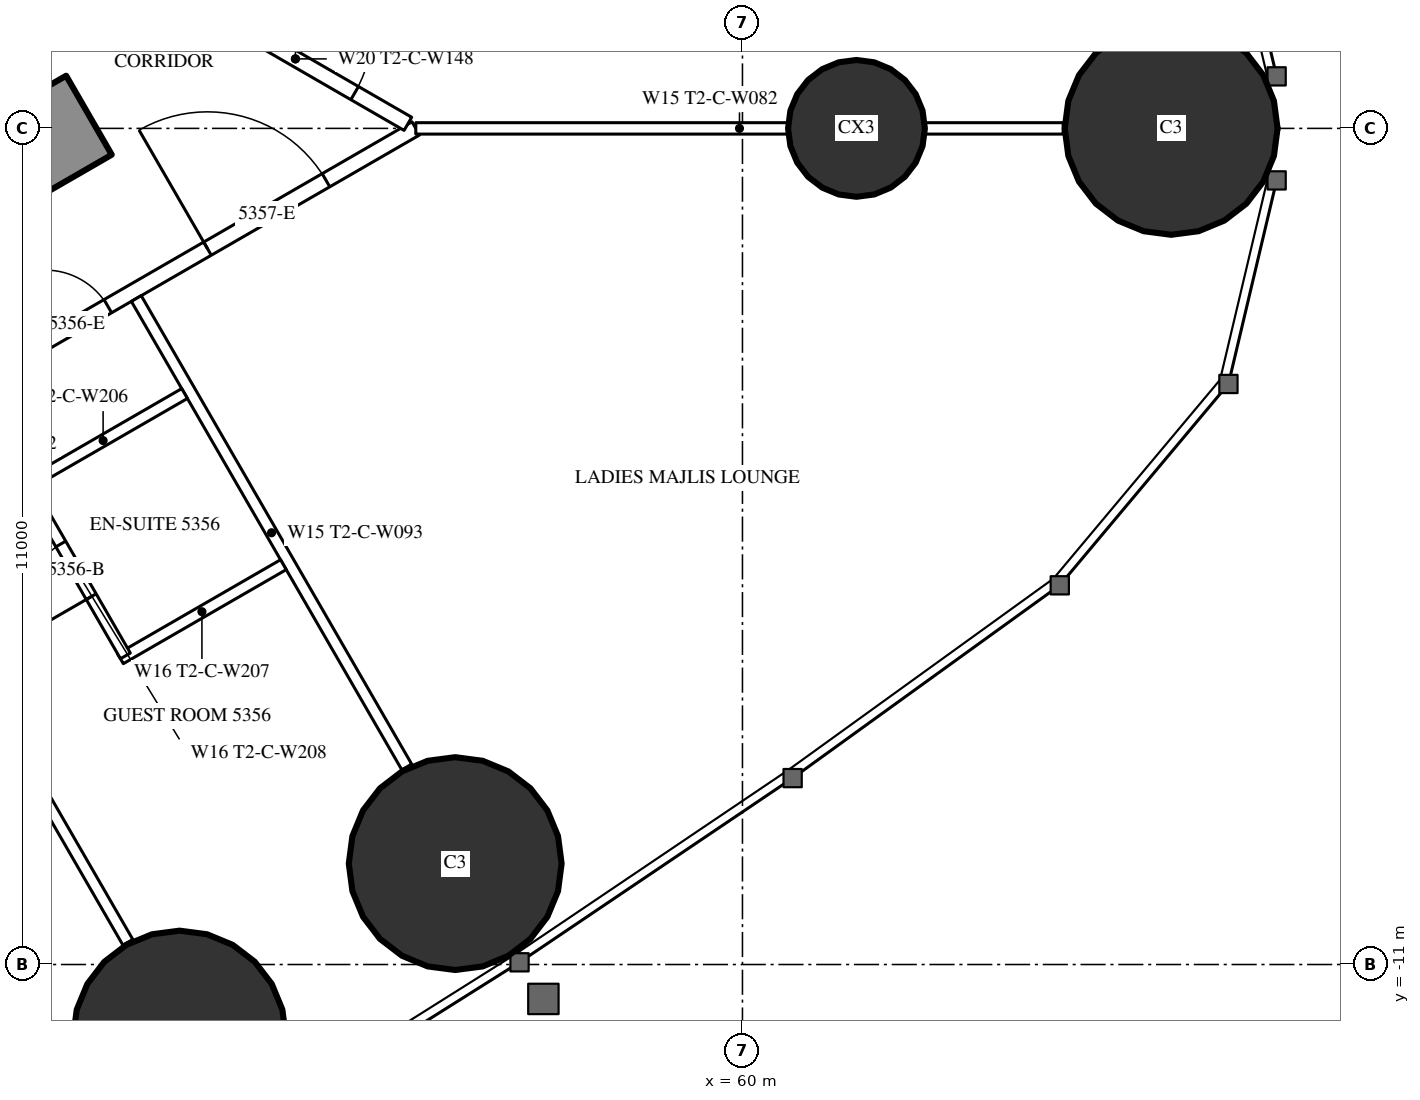
"""IFC4 building model, lengths in metres.
Left out: names, types, materials, properties, quantities, classifications, styles, units other than length and angle.
Written with IfcOpenShell. Run it as: python <this file> out.ifc"""

import sys

from ifc_helpers import new_model, si_unit, direction, frame, frame_2d, origin, origin_2d, place, context, subcontext, project, spatial, rectangle, circle, extrude, element, fill, save


model = new_model("IFC4")
c1 = context("Model", 3, precision=1e-05, world=origin(), true_north=direction((0.0, 1.0)))
c2 = subcontext(c1, "Body", "Model", "MODEL_VIEW")
j1 = project(units=[si_unit("LENGTHUNIT", "METRE"), si_unit("PLANEANGLEUNIT", "RADIAN")], contexts=[c1])
p1 = place(None, origin())
s1 = spatial("IfcSite", under=j1, at=p1, CompositionType="ELEMENT")
p2 = place(p1, origin())
s2 = spatial("IfcBuilding", under=s1, at=p2, CompositionType="ELEMENT")
p3 = place(p2, frame((0.0, 0.0, 198.3)))
s3 = spatial("IfcBuildingStorey", under=s2, at=p3, CompositionType="ELEMENT", Elevation=198.3)
for number, where, z_axis, x_axis in (
    (1, (65.64, 0.0, 0.0), (0.0, 0.0, 1.0), (1.0, 0.0, 0.0)),
    (2, (52.594, -11.955, 0.0), (0.0, 0.0, 1.0), (1.0, 0.0, 0.0)),
    (3, (56.221, -9.672, 0.0), (0.0, 0.0, 1.0), (1.0, 0.0, 0.0)),
):
    element("IfcColumn", number, at=place(p3, frame(where, z_axis=z_axis, x_axis=x_axis)), inside=s3, PredefinedType="COLUMN", context=c2, shape_type="SweptSolid", body=[
        extrude(circle(Radius=1.4, at=origin_2d()), origin(), (0.0, 0.0, 1.0), 3.5),
    ])
p4 = place(p3, frame((61.5, 0.0, 0.0), z_axis=(0.0, 0.0, 1.0), x_axis=(1.0, 0.0, 0.0)))
e4 = element("IfcColumn", 4, at=p4, inside=s3, PredefinedType="COLUMN", context=c2, shape_type="SweptSolid", body=[
    extrude(circle(Radius=0.9, at=origin_2d()), origin(), (0.0, 0.0, 1.0), 3.5),
])
p5 = place(p3, frame((27.2, -13.8, 0.0), z_axis=(0.0, 0.0, 1.0), x_axis=(0.866027159892, 0.499996958321, 0.0)))
e5 = element("IfcWall", 5, at=p5, inside=s3, PredefinedType="SHEAR", context=c2, shape_type="SweptSolid", body=[
    extrude(rectangle(XDim=27.947, YDim=1.2, at=frame_2d((13.973, 0.0))), origin(), (0.0, 0.0, 1.0), 3.5),
])
p6 = place(p5, frame((4.6, 0.0, 0.0)))
e6 = element("IfcOpeningElement", 6, at=p6, cuts=e5, PredefinedType="OPENING", context=c2, shape_type="SweptSolid", body=[
    extrude(rectangle(XDim=1.0, YDim=2.2, at=frame_2d((0.5, 1.1))), frame((0.0, 0.61, 0.0), z_axis=(0.0, -1.0, 0.0), x_axis=(1.0, 0.0, 0.0)), (0.0, 0.0, 1.0), 1.22),
])
p7 = place(p5, frame((13.395, 0.0, 0.0)))
e7 = element("IfcOpeningElement", 7, at=p7, cuts=e5, PredefinedType="OPENING", context=c2, shape_type="SweptSolid", body=[
    extrude(rectangle(XDim=1.8, YDim=2.2, at=frame_2d((0.9, 1.1))), frame((0.0, 0.61, 0.0), z_axis=(0.0, -1.0, 0.0), x_axis=(1.0, 0.0, 0.0)), (0.0, 0.0, 1.0), 1.22),
])
p8 = place(p3, frame((27.959, -16.017, 0.0), z_axis=(0.0, 0.0, 1.0), x_axis=(0.866024151371, 0.500002169237, 0.0)))
e8 = element("IfcWall", 8, at=p8, inside=s3, PredefinedType="PARTITIONING", context=c2, shape_type="SweptSolid", body=[
    extrude(rectangle(XDim=32.034, YDim=0.2, at=frame_2d((16.017, 0.0))), origin(), (0.0, 0.0, 1.0), 3.25),
])
p9 = place(p8, frame((0.6, 0.0, 0.0)))
e9 = element("IfcOpeningElement", 9, at=p9, cuts=e8, PredefinedType="OPENING", context=c2, shape_type="SweptSolid", body=[
    extrude(rectangle(XDim=0.95, YDim=2.2, at=frame_2d((0.475, 1.1))), frame((0.0, 0.11, 0.0), z_axis=(0.0, -1.0, 0.0), x_axis=(1.0, 0.0, 0.0)), (0.0, 0.0, 1.0), 0.22),
])
p10 = place(p8, frame((13.132, 0.0, 0.0)))
e10 = element("IfcOpeningElement", 10, at=p10, cuts=e8, PredefinedType="OPENING", context=c2, shape_type="SweptSolid", body=[
    extrude(rectangle(XDim=0.95, YDim=2.2, at=frame_2d((0.475, 1.1))), frame((0.0, 0.11, 0.0), z_axis=(0.0, -1.0, 0.0), x_axis=(1.0, 0.0, 0.0)), (0.0, 0.0, 1.0), 0.22),
])
p11 = place(p8, frame((15.391, 0.0, 0.0)))
e11 = element("IfcOpeningElement", 11, at=p11, cuts=e8, PredefinedType="OPENING", context=c2, shape_type="SweptSolid", body=[
    extrude(rectangle(XDim=0.95, YDim=2.2, at=frame_2d((0.475, 1.1))), frame((0.0, 0.11, 0.0), z_axis=(0.0, -1.0, 0.0), x_axis=(1.0, 0.0, 0.0)), (0.0, 0.0, 1.0), 0.22),
])
p12 = place(p8, frame((19.441, 0.0, 0.0)))
e12 = element("IfcOpeningElement", 12, at=p12, cuts=e8, PredefinedType="OPENING", context=c2, shape_type="SweptSolid", body=[
    extrude(rectangle(XDim=0.95, YDim=2.2, at=frame_2d((0.475, 1.1))), frame((0.0, 0.11, 0.0), z_axis=(0.0, -1.0, 0.0), x_axis=(1.0, 0.0, 0.0)), (0.0, 0.0, 1.0), 0.22),
])
p13 = place(p8, frame((26.406, 0.0, 0.0)))
e13 = element("IfcOpeningElement", 13, at=p13, cuts=e8, PredefinedType="OPENING", context=c2, shape_type="SweptSolid", body=[
    extrude(rectangle(XDim=0.95, YDim=2.2, at=frame_2d((0.475, 1.1))), frame((0.0, 0.11, 0.0), z_axis=(0.0, -1.0, 0.0), x_axis=(1.0, 0.0, 0.0)), (0.0, 0.0, 1.0), 0.22),
])
p14 = place(p8, frame((28.87, 0.0, 0.0)))
e14 = element("IfcOpeningElement", 14, at=p14, cuts=e8, PredefinedType="OPENING", context=c2, shape_type="SweptSolid", body=[
    extrude(rectangle(XDim=1.8, YDim=2.2, at=frame_2d((0.9, 1.1))), frame((0.0, 0.11, 0.0), z_axis=(0.0, -1.0, 0.0), x_axis=(1.0, 0.0, 0.0)), (0.0, 0.0, 1.0), 0.22),
])
p15 = place(p3, frame((48.275, -4.404, 0.0), z_axis=(0.0, 0.0, 1.0), x_axis=(0.500006004368, -0.866021937133, 0.0)))
e15 = element("IfcWall", 15, at=p15, inside=s3, PredefinedType="PARTITIONING", context=c2, shape_type="SweptSolid", body=[
    extrude(rectangle(XDim=7.279, YDim=0.15, at=frame_2d((3.64, 0.0))), origin(), (0.0, 0.0, 1.0), 2.3),
])
p16 = place(p3, frame((52.025, -2.238, 0.0), z_axis=(0.0, 0.0, 1.0), x_axis=(0.499983785035, -0.866034765296, 0.0)))
e16 = element("IfcWall", 16, at=p16, inside=s3, PredefinedType="PARTITIONING", context=c2, shape_type="SweptSolid", body=[
    extrude(rectangle(XDim=7.116, YDim=0.15, at=frame_2d((3.558, 0.0))), origin(), (0.0, 0.0, 1.0), 2.3),
])
p17 = place(p3, frame((55.702, 0.0, 0.0), z_axis=(0.0, 0.0, 1.0), x_axis=(1.0, 0.0, 0.0)))
e17 = element("IfcWall", 17, at=p17, inside=s3, PredefinedType="PARTITIONING", context=c2, shape_type="SweptSolid", body=[
    extrude(rectangle(XDim=8.518, YDim=0.15, at=frame_2d((4.259, 0.0))), origin(), (0.0, 0.0, 1.0), 2.3),
])
p18 = place(p3, frame((52.639, 1.769, 0.0), z_axis=(0.0, 0.0, 1.0), x_axis=(0.866027340901, -0.4999966448, 0.0)))
e18 = element("IfcWall", 18, at=p18, inside=s3, PredefinedType="PARTITIONING", context=c2, shape_type="SweptSolid", body=[
    extrude(rectangle(XDim=3.417, YDim=0.2, at=frame_2d((1.708, 0.0))), origin(), (0.0, 0.0, 1.0), 3.25),
])
p19 = place(p18, frame((0.809, 0.0, 0.0)))
e19 = element("IfcOpeningElement", 19, at=p19, cuts=e18, PredefinedType="OPENING", context=c2, shape_type="SweptSolid", body=[
    extrude(rectangle(XDim=1.8, YDim=2.2, at=frame_2d((0.9, 1.1))), frame((0.0, 0.11, 0.0), z_axis=(0.0, -1.0, 0.0), x_axis=(1.0, 0.0, 0.0)), (0.0, 0.0, 1.0), 0.22),
])
p20 = place(p3, frame((51.817, -6.978, 0.0), z_axis=(0.0, 0.0, 1.0), x_axis=(0.866006523861, 0.500032699561, 0.0)))
e20 = element("IfcWall", 20, at=p20, inside=s3, PredefinedType="PARTITIONING", context=c2, shape_type="SweptSolid", body=[
    extrude(rectangle(XDim=2.475, YDim=0.15, at=frame_2d((1.237, 0.0))), origin(), (0.0, 0.0, 1.0), 3.25),
])
p21 = place(p3, frame((50.582, -4.688, 0.0), z_axis=(0.0, 0.0, 1.0), x_axis=(0.500006934395, -0.866021400173, 0.0)))
e21 = element("IfcWall", 21, at=p21, inside=s3, PredefinedType="PARTITIONING", context=c2, shape_type="SweptSolid", body=[
    extrude(rectangle(XDim=2.6, YDim=0.15, at=frame_2d((1.3, 0.0))), origin(), (0.0, 0.0, 1.0), 3.25),
])
p22 = place(p21, frame((0.9, 0.0, 0.0)))
e22 = element("IfcOpeningElement", 22, at=p22, cuts=e21, PredefinedType="OPENING", context=c2, shape_type="SweptSolid", body=[
    extrude(rectangle(XDim=0.8, YDim=2.2, at=frame_2d((0.4, 1.1))), frame((0.0, 0.085, 0.0), z_axis=(0.0, -1.0, 0.0), x_axis=(1.0, 0.0, 0.0)), (0.0, 0.0, 1.0), 0.17),
])
p23 = place(p3, frame((50.517, -4.726, 0.0), z_axis=(0.0, 0.0, 1.0), x_axis=(0.866031185235, 0.4999899861, 0.0)))
e23 = element("IfcWall", 23, at=p23, inside=s3, PredefinedType="PARTITIONING", context=c2, shape_type="SweptSolid", body=[
    extrude(rectangle(XDim=2.475, YDim=0.15, at=frame_2d((1.238, 0.0))), origin(), (0.0, 0.0, 1.0), 3.25),
])
p24 = place(p22, origin())
e24 = element("IfcDoor", 24, at=p24, inside=s3, OperationType="SINGLE_SWING_RIGHT", PredefinedType="DOOR", context=c2, shape_type="SweptSolid", body=[
    extrude(rectangle(XDim=0.8, YDim=2.2, at=frame_2d((0.4, 1.1))), frame((0.0, 0.025, 0.0), z_axis=(0.0, -1.0, 0.0), x_axis=(1.0, 0.0, 0.0)), (0.0, 0.0, 1.0), 0.05),
])
fill(e22, e24)
p25 = place(p13, origin())
e25 = element("IfcDoor", 25, at=p25, inside=s3, OperationType="SINGLE_SWING_LEFT", PredefinedType="DOOR", context=c2, shape_type="SweptSolid", body=[
    extrude(rectangle(XDim=0.95, YDim=2.2, at=frame_2d((0.475, 1.1))), frame((0.0, 0.025, 0.0), z_axis=(0.0, -1.0, 0.0), x_axis=(1.0, 0.0, 0.0)), (0.0, 0.0, 1.0), 0.05),
])
fill(e13, e25)
p26 = place(p14, origin())
e26 = element("IfcDoor", 26, at=p26, inside=s3, OperationType="DOUBLE_DOOR_SINGLE_SWING", PredefinedType="DOOR", context=c2, shape_type="SweptSolid", body=[
    extrude(rectangle(XDim=1.8, YDim=2.2, at=frame_2d((0.9, 1.1))), frame((0.0, 0.025, 0.0), z_axis=(0.0, -1.0, 0.0), x_axis=(1.0, 0.0, 0.0)), (0.0, 0.0, 1.0), 0.05),
])
fill(e14, e26)
p27 = place(p19, origin())
e27 = element("IfcDoor", 27, at=p27, inside=s3, OperationType="DOUBLE_DOOR_SINGLE_SWING", PredefinedType="DOOR", context=c2, shape_type="SweptSolid", body=[
    extrude(rectangle(XDim=1.8, YDim=2.2, at=frame_2d((0.9, 1.1))), frame((0.0, 0.025, 0.0), z_axis=(0.0, -1.0, 0.0), x_axis=(1.0, 0.0, 0.0)), (0.0, 0.0, 1.0), 0.05),
])
fill(e19, e27)
save(model, sys.argv[1])
